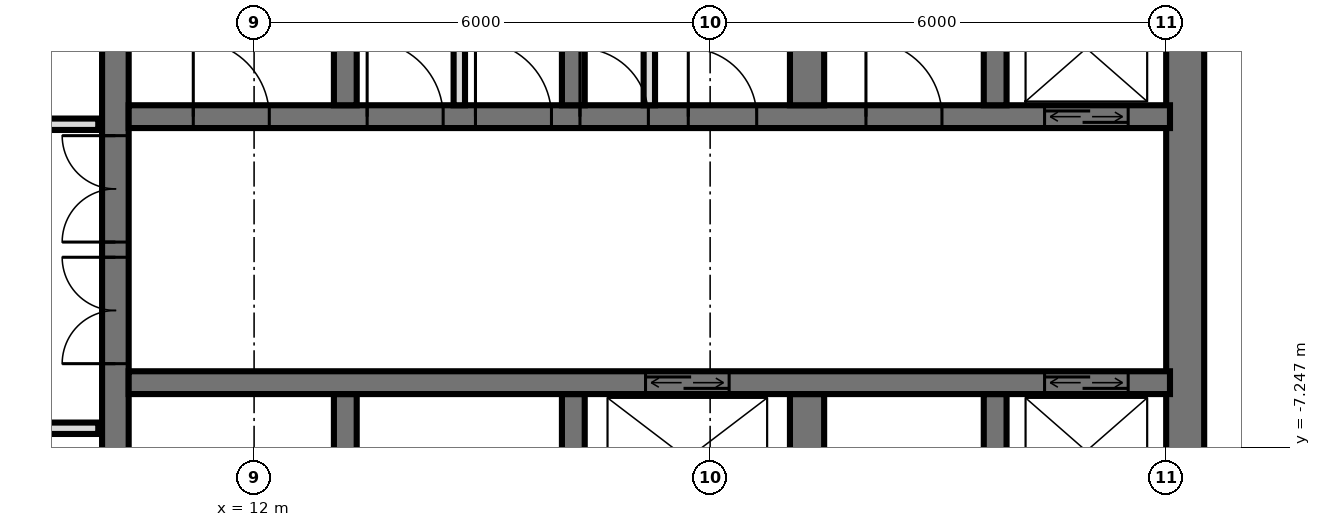
"""IFC4 building model, lengths in metres.
Left out: names, types, materials, properties, quantities, classifications, styles, units other than length and angle.
Written with IfcOpenShell. Run it as: python <this file> out.ifc"""

import sys

from ifc_helpers import new_model, si_unit, direction, frame, frame_2d, origin, place, context, subcontext, project, spatial, rectangle, extrude, element, fill, save


model = new_model("IFC4")
c1 = context("Model", 3, precision=1e-05, world=origin(), true_north=direction((0.0, 1.0)))
c2 = subcontext(c1, "Body", "Model", "MODEL_VIEW")
j1 = project(units=[si_unit("LENGTHUNIT", "METRE"), si_unit("PLANEANGLEUNIT", "RADIAN")], contexts=[c1])
p1 = place(None, origin())
s1 = spatial("IfcSite", under=j1, at=p1, CompositionType="ELEMENT")
p2 = place(p1, origin())
s2 = spatial("IfcBuilding", under=s1, at=p2, CompositionType="ELEMENT")
p3 = place(p2, frame((0.0, 0.0, 170.4)))
s3 = spatial("IfcBuildingStorey", under=s2, at=p3, CompositionType="ELEMENT", Elevation=170.4)
p4 = place(p3, frame((10.175, -14.55, 0.0), z_axis=(0.0, 0.0, 1.0), x_axis=(0.0, 1.0, 0.0)))
e1 = element("IfcWall", 1, at=p4, inside=s3, PredefinedType="SHEAR", context=c2, shape_type="SweptSolid", body=[
    extrude(rectangle(XDim=14.1, YDim=0.35, at=frame_2d((7.05, 0.0))), origin(), (0.0, 0.0, 1.0), 3.6),
])
p5 = place(p4, frame((8.4, 0.0, 0.0)))
e2 = element("IfcOpeningElement", 2, at=p5, cuts=e1, PredefinedType="OPENING", context=c2, shape_type="SweptSolid", body=[
    extrude(rectangle(XDim=1.4, YDim=2.4, at=frame_2d((0.7, 1.2))), frame((0.0, 0.185, 0.0), z_axis=(0.0, -1.0, 0.0), x_axis=(1.0, 0.0, 0.0)), (0.0, 0.0, 1.0), 0.37),
])
p6 = place(p4, frame((10.0, 0.0, 0.0)))
e3 = element("IfcOpeningElement", 3, at=p6, cuts=e1, PredefinedType="OPENING", context=c2, shape_type="SweptSolid", body=[
    extrude(rectangle(XDim=1.4, YDim=2.4, at=frame_2d((0.7, 1.2))), frame((0.0, 0.185, 0.0), z_axis=(0.0, -1.0, 0.0), x_axis=(1.0, 0.0, 0.0)), (0.0, 0.0, 1.0), 0.37),
])
p7 = place(p4, frame((4.0, 0.0, 0.0)))
e4 = element("IfcOpeningElement", 4, at=p7, cuts=e1, PredefinedType="OPENING", context=c2, shape_type="SweptSolid", body=[
    extrude(rectangle(XDim=1.2, YDim=2.1, at=frame_2d((0.6, 1.05))), frame((0.0, 0.185, 0.0), z_axis=(0.0, -1.0, 0.0), x_axis=(1.0, 0.0, 0.0)), (0.0, 0.0, 1.0), 0.37),
])
p8 = place(p3, frame((24.25, -14.55, 0.0), z_axis=(0.0, 0.0, 1.0), x_axis=(0.0, 1.0, 0.0)))
e5 = element("IfcWall", 5, at=p8, inside=s3, PredefinedType="SHEAR", context=c2, shape_type="SweptSolid", body=[
    extrude(rectangle(XDim=14.1, YDim=0.5, at=frame_2d((7.05, 0.0))), origin(), (0.0, 0.0, 1.0), 3.6),
])
p9 = place(p3, frame((10.35, -2.9, 0.0), z_axis=(0.0, 0.0, 1.0), x_axis=(1.0, 0.0, 0.0)))
e6 = element("IfcWall", 6, at=p9, inside=s3, PredefinedType="SHEAR", context=c2, shape_type="SweptSolid", body=[
    extrude(rectangle(XDim=13.7, YDim=0.3, at=frame_2d((6.85, 0.0))), origin(), (0.0, 0.0, 1.0), 3.6),
])
p10 = place(p9, frame((12.05, 0.0, 0.0)))
e7 = element("IfcOpeningElement", 7, at=p10, cuts=e6, PredefinedType="OPENING", context=c2, shape_type="SweptSolid", body=[
    extrude(rectangle(XDim=1.1, YDim=2.1, at=frame_2d((0.55, 1.05))), frame((0.0, 0.16, 0.0), z_axis=(0.0, -1.0, 0.0), x_axis=(1.0, 0.0, 0.0)), (0.0, 0.0, 1.0), 0.32),
])
p11 = place(p9, frame((5.938, 0.0, 0.0)))
e8 = element("IfcOpeningElement", 8, at=p11, cuts=e6, PredefinedType="OPENING", context=c2, shape_type="SweptSolid", body=[
    extrude(rectangle(XDim=0.9, YDim=2.1, at=frame_2d((0.45, 1.05))), frame((0.0, 0.16, 0.0), z_axis=(0.0, -1.0, 0.0), x_axis=(1.0, 0.0, 0.0)), (0.0, 0.0, 1.0), 0.32),
])
p12 = place(p9, frame((7.363, 0.0, 0.0)))
e9 = element("IfcOpeningElement", 9, at=p12, cuts=e6, PredefinedType="OPENING", context=c2, shape_type="SweptSolid", body=[
    extrude(rectangle(XDim=0.9, YDim=2.1, at=frame_2d((0.45, 1.05))), frame((0.0, 0.16, 0.0), z_axis=(0.0, -1.0, 0.0), x_axis=(1.0, 0.0, 0.0)), (0.0, 0.0, 1.0), 0.32),
])
p13 = place(p9, frame((0.85, 0.0, 0.0)))
e10 = element("IfcOpeningElement", 10, at=p13, cuts=e6, PredefinedType="OPENING", context=c2, shape_type="SweptSolid", body=[
    extrude(rectangle(XDim=1.0, YDim=2.1, at=frame_2d((0.5, 1.05))), frame((0.0, 0.16, 0.0), z_axis=(0.0, -1.0, 0.0), x_axis=(1.0, 0.0, 0.0)), (0.0, 0.0, 1.0), 0.32),
])
p14 = place(p9, frame((3.137, 0.0, 0.0)))
e11 = element("IfcOpeningElement", 11, at=p14, cuts=e6, PredefinedType="OPENING", context=c2, shape_type="SweptSolid", body=[
    extrude(rectangle(XDim=1.0, YDim=2.1, at=frame_2d((0.5, 1.05))), frame((0.0, 0.16, 0.0), z_axis=(0.0, -1.0, 0.0), x_axis=(1.0, 0.0, 0.0)), (0.0, 0.0, 1.0), 0.32),
])
p15 = place(p9, frame((4.562, 0.0, 0.0)))
e12 = element("IfcOpeningElement", 12, at=p15, cuts=e6, PredefinedType="OPENING", context=c2, shape_type="SweptSolid", body=[
    extrude(rectangle(XDim=1.0, YDim=2.1, at=frame_2d((0.5, 1.05))), frame((0.0, 0.16, 0.0), z_axis=(0.0, -1.0, 0.0), x_axis=(1.0, 0.0, 0.0)), (0.0, 0.0, 1.0), 0.32),
])
p16 = place(p9, frame((9.7, 0.0, 0.0)))
e13 = element("IfcOpeningElement", 13, at=p16, cuts=e6, PredefinedType="OPENING", context=c2, shape_type="SweptSolid", body=[
    extrude(rectangle(XDim=1.0, YDim=2.1, at=frame_2d((0.5, 1.05))), frame((0.0, 0.16, 0.0), z_axis=(0.0, -1.0, 0.0), x_axis=(1.0, 0.0, 0.0)), (0.0, 0.0, 1.0), 0.32),
])
p17 = place(p3, frame((10.35, -6.4, 0.0), z_axis=(0.0, 0.0, 1.0), x_axis=(1.0, 0.0, 0.0)))
e14 = element("IfcWall", 14, at=p17, inside=s3, PredefinedType="SHEAR", context=c2, shape_type="SweptSolid", body=[
    extrude(rectangle(XDim=13.7, YDim=0.3, at=frame_2d((6.85, 0.0))), origin(), (0.0, 0.0, 1.0), 3.6),
])
p18 = place(p17, frame((12.05, 0.0, 0.0)))
e15 = element("IfcOpeningElement", 15, at=p18, cuts=e14, PredefinedType="OPENING", context=c2, shape_type="SweptSolid", body=[
    extrude(rectangle(XDim=1.1, YDim=2.1, at=frame_2d((0.55, 1.05))), frame((0.0, 0.16, 0.0), z_axis=(0.0, -1.0, 0.0), x_axis=(1.0, 0.0, 0.0)), (0.0, 0.0, 1.0), 0.32),
])
p19 = place(p17, frame((6.8, 0.0, 0.0)))
e16 = element("IfcOpeningElement", 16, at=p19, cuts=e14, PredefinedType="OPENING", context=c2, shape_type="SweptSolid", body=[
    extrude(rectangle(XDim=1.1, YDim=2.1, at=frame_2d((0.55, 1.05))), frame((0.0, 0.16, 0.0), z_axis=(0.0, -1.0, 0.0), x_axis=(1.0, 0.0, 0.0)), (0.0, 0.0, 1.0), 0.32),
])
for number, where, z_axis, x_axis in (
    (17, (13.2, -2.75, 0.0), (0.0, 0.0, 1.0), (0.0, 1.0, 0.0)),
    (18, (13.2, -8.85, 0.0), (0.0, 0.0, 1.0), (0.0, 1.0, 0.0)),
    (19, (16.2, -2.75, 0.0), (0.0, 0.0, 1.0), (0.0, 1.0, 0.0)),
    (20, (16.2, -8.85, 0.0), (0.0, 0.0, 1.0), (0.0, 1.0, 0.0)),
):
    element("IfcWall", number, at=place(p3, frame(where, z_axis=z_axis, x_axis=x_axis)), inside=s3, PredefinedType="SHEAR", context=c2, shape_type="SweptSolid", body=[
        extrude(rectangle(XDim=2.3, YDim=0.3, at=frame_2d((1.15, 0.0))), origin(), (0.0, 0.0, 1.0), 3.6),
    ])
for number, where, z_axis, x_axis in (
    (21, (19.275, -2.75, 0.0), (0.0, 0.0, 1.0), (0.0, 1.0, 0.0)),
    (22, (19.275, -8.85, 0.0), (0.0, 0.0, 1.0), (0.0, 1.0, 0.0)),
):
    element("IfcWall", number, at=place(p3, frame(where, z_axis=z_axis, x_axis=x_axis)), inside=s3, PredefinedType="SHEAR", context=c2, shape_type="SweptSolid", body=[
        extrude(rectangle(XDim=2.3, YDim=0.45, at=frame_2d((1.15, 0.0))), origin(), (0.0, 0.0, 1.0), 3.6),
    ])
for number, where, z_axis, x_axis in (
    (23, (21.75, -2.75, 0.0), (0.0, 0.0, 1.0), (0.0, 1.0, 0.0)),
    (24, (21.75, -8.85, 0.0), (0.0, 0.0, 1.0), (0.0, 1.0, 0.0)),
):
    element("IfcWall", number, at=place(p3, frame(where, z_axis=z_axis, x_axis=x_axis)), inside=s3, PredefinedType="SHEAR", context=c2, shape_type="SweptSolid", body=[
        extrude(rectangle(XDim=2.3, YDim=0.3, at=frame_2d((1.15, 0.0))), origin(), (0.0, 0.0, 1.0), 3.6),
    ])
for number, where, z_axis, x_axis in (
    (25, (17.2, -2.75, 0.0), (0.0, 0.0, 1.0), (0.0, 1.0, 0.0)),
    (26, (14.7, -2.75, 0.0), (0.0, 0.0, 1.0), (0.0, 1.0, 0.0)),
):
    element("IfcWall", number, at=place(p3, frame(where, z_axis=z_axis, x_axis=x_axis)), inside=s3, PredefinedType="PARTITIONING", context=c2, shape_type="SweptSolid", body=[
        extrude(rectangle(XDim=2.3, YDim=0.15, at=frame_2d((1.15, 0.0))), origin(), (0.0, 0.0, 1.0), 3.3),
    ])
p20 = place(p3, frame((-9.95, -7.0, 0.0), z_axis=(0.0, 0.0, 1.0), x_axis=(1.0, 0.0, 0.0)))
e27 = element("IfcWall", 27, at=p20, inside=s3, PredefinedType="PARTITIONING", context=c2, shape_type="SweptSolid", body=[
    extrude(rectangle(XDim=19.9, YDim=0.15, at=frame_2d((9.95, 0.0))), origin(), (0.0, 0.0, 1.0), 3.32),
])
p21 = place(p20, frame((9.45, 0.0, 0.0)))
e28 = element("IfcOpeningElement", 28, at=p21, cuts=e27, PredefinedType="OPENING", context=c2, shape_type="SweptSolid", body=[
    extrude(rectangle(XDim=1.0, YDim=2.1, at=frame_2d((0.5, 1.05))), frame((0.0, 0.085, 0.0), z_axis=(0.0, -1.0, 0.0), x_axis=(1.0, 0.0, 0.0)), (0.0, 0.0, 1.0), 0.17),
])
p22 = place(p20, frame((15.45, 0.0, 0.0)))
e29 = element("IfcOpeningElement", 29, at=p22, cuts=e27, PredefinedType="OPENING", context=c2, shape_type="SweptSolid", body=[
    extrude(rectangle(XDim=1.0, YDim=2.1, at=frame_2d((0.5, 1.05))), frame((0.0, 0.085, 0.0), z_axis=(0.0, -1.0, 0.0), x_axis=(1.0, 0.0, 0.0)), (0.0, 0.0, 1.0), 0.17),
])
p23 = place(p3, frame((-9.95, -3.0, 0.0), z_axis=(0.0, 0.0, 1.0), x_axis=(1.0, 0.0, 0.0)))
e30 = element("IfcWall", 30, at=p23, inside=s3, PredefinedType="PARTITIONING", context=c2, shape_type="SweptSolid", body=[
    extrude(rectangle(XDim=19.9, YDim=0.15, at=frame_2d((9.95, 0.0))), origin(), (0.0, 0.0, 1.0), 3.32),
])
p24 = place(p23, frame((2.2, 0.0, 0.0)))
e31 = element("IfcOpeningElement", 31, at=p24, cuts=e30, PredefinedType="OPENING", context=c2, shape_type="SweptSolid", body=[
    extrude(rectangle(XDim=1.0, YDim=2.1, at=frame_2d((0.5, 1.05))), frame((0.0, 0.085, 0.0), z_axis=(0.0, -1.0, 0.0), x_axis=(1.0, 0.0, 0.0)), (0.0, 0.0, 1.0), 0.17),
])
p25 = place(p23, frame((7.2, 0.0, 0.0)))
e32 = element("IfcOpeningElement", 32, at=p25, cuts=e30, PredefinedType="OPENING", context=c2, shape_type="SweptSolid", body=[
    extrude(rectangle(XDim=1.0, YDim=2.1, at=frame_2d((0.5, 1.05))), frame((0.0, 0.085, 0.0), z_axis=(0.0, -1.0, 0.0), x_axis=(1.0, 0.0, 0.0)), (0.0, 0.0, 1.0), 0.17),
])
p26 = place(p23, frame((11.7, 0.0, 0.0)))
e33 = element("IfcOpeningElement", 33, at=p26, cuts=e30, PredefinedType="OPENING", context=c2, shape_type="SweptSolid", body=[
    extrude(rectangle(XDim=1.0, YDim=2.1, at=frame_2d((0.5, 1.05))), frame((0.0, 0.085, 0.0), z_axis=(0.0, -1.0, 0.0), x_axis=(1.0, 0.0, 0.0)), (0.0, 0.0, 1.0), 0.17),
])
p27 = place(p23, frame((15.45, 0.0, 0.0)))
e34 = element("IfcOpeningElement", 34, at=p27, cuts=e30, PredefinedType="OPENING", context=c2, shape_type="SweptSolid", body=[
    extrude(rectangle(XDim=1.0, YDim=2.1, at=frame_2d((0.5, 1.05))), frame((0.0, 0.085, 0.0), z_axis=(0.0, -1.0, 0.0), x_axis=(1.0, 0.0, 0.0)), (0.0, 0.0, 1.0), 0.17),
])
p28 = place(p23, frame((18.2, 0.0, 0.0)))
e35 = element("IfcOpeningElement", 35, at=p28, cuts=e30, PredefinedType="OPENING", context=c2, shape_type="SweptSolid", body=[
    extrude(rectangle(XDim=1.0, YDim=2.1, at=frame_2d((0.5, 1.05))), frame((0.0, 0.085, 0.0), z_axis=(0.0, -1.0, 0.0), x_axis=(1.0, 0.0, 0.0)), (0.0, 0.0, 1.0), 0.17),
])
p29 = place(p10, origin())
e36 = element("IfcDoor", 36, at=p29, inside=s3, OperationType="DOUBLE_DOOR_SLIDING", PredefinedType="USERDEFINED", context=c2, shape_type="SweptSolid", body=[
    extrude(rectangle(XDim=1.1, YDim=2.1, at=frame_2d((0.55, 1.05))), frame((0.0, 0.025, 0.0), z_axis=(0.0, -1.0, 0.0), x_axis=(1.0, 0.0, 0.0)), (0.0, 0.0, 1.0), 0.05),
])
fill(e7, e36)
p30 = place(p18, origin())
e37 = element("IfcDoor", 37, at=p30, inside=s3, OperationType="DOUBLE_DOOR_SLIDING", PredefinedType="USERDEFINED", context=c2, shape_type="SweptSolid", body=[
    extrude(rectangle(XDim=1.1, YDim=2.1, at=frame_2d((0.55, 1.05))), frame((0.0, 0.025, 0.0), z_axis=(0.0, -1.0, 0.0), x_axis=(1.0, 0.0, 0.0)), (0.0, 0.0, 1.0), 0.05),
])
fill(e15, e37)
p31 = place(p19, origin())
e38 = element("IfcDoor", 38, at=p31, inside=s3, OperationType="DOUBLE_DOOR_SLIDING", PredefinedType="USERDEFINED", context=c2, shape_type="SweptSolid", body=[
    extrude(rectangle(XDim=1.1, YDim=2.1, at=frame_2d((0.55, 1.05))), frame((0.0, 0.025, 0.0), z_axis=(0.0, -1.0, 0.0), x_axis=(1.0, 0.0, 0.0)), (0.0, 0.0, 1.0), 0.05),
])
fill(e16, e38)
p32 = place(p5, origin())
e39 = element("IfcDoor", 39, at=p32, inside=s3, OperationType="DOUBLE_DOOR_SINGLE_SWING", PredefinedType="DOOR", context=c2, shape_type="SweptSolid", body=[
    extrude(rectangle(XDim=1.4, YDim=2.4, at=frame_2d((0.7, 1.2))), frame((0.0, 0.025, 0.0), z_axis=(0.0, -1.0, 0.0), x_axis=(1.0, 0.0, 0.0)), (0.0, 0.0, 1.0), 0.05),
])
fill(e2, e39)
p33 = place(p6, origin())
e40 = element("IfcDoor", 40, at=p33, inside=s3, OperationType="DOUBLE_DOOR_SINGLE_SWING", PredefinedType="DOOR", context=c2, shape_type="SweptSolid", body=[
    extrude(rectangle(XDim=1.4, YDim=2.4, at=frame_2d((0.7, 1.2))), frame((0.0, 0.025, 0.0), z_axis=(0.0, -1.0, 0.0), x_axis=(1.0, 0.0, 0.0)), (0.0, 0.0, 1.0), 0.05),
])
fill(e3, e40)
p34 = place(p11, origin())
e41 = element("IfcDoor", 41, at=p34, inside=s3, OperationType="SINGLE_SWING_RIGHT", PredefinedType="DOOR", context=c2, shape_type="SweptSolid", body=[
    extrude(rectangle(XDim=0.9, YDim=2.1, at=frame_2d((0.45, 1.05))), frame((0.0, 0.025, 0.0), z_axis=(0.0, -1.0, 0.0), x_axis=(1.0, 0.0, 0.0)), (0.0, 0.0, 1.0), 0.05),
])
fill(e8, e41)
p35 = place(p12, origin())
e42 = element("IfcDoor", 42, at=p35, inside=s3, OperationType="SINGLE_SWING_RIGHT", PredefinedType="DOOR", context=c2, shape_type="SweptSolid", body=[
    extrude(rectangle(XDim=0.9, YDim=2.1, at=frame_2d((0.45, 1.05))), frame((0.0, 0.025, 0.0), z_axis=(0.0, -1.0, 0.0), x_axis=(1.0, 0.0, 0.0)), (0.0, 0.0, 1.0), 0.05),
])
fill(e9, e42)
p36 = place(p13, origin())
e43 = element("IfcDoor", 43, at=p36, inside=s3, OperationType="SINGLE_SWING_RIGHT", PredefinedType="DOOR", context=c2, shape_type="SweptSolid", body=[
    extrude(rectangle(XDim=1.0, YDim=2.1, at=frame_2d((0.5, 1.05))), frame((0.0, 0.025, 0.0), z_axis=(0.0, -1.0, 0.0), x_axis=(1.0, 0.0, 0.0)), (0.0, 0.0, 1.0), 0.05),
])
fill(e10, e43)
p37 = place(p14, origin())
e44 = element("IfcDoor", 44, at=p37, inside=s3, OperationType="SINGLE_SWING_RIGHT", PredefinedType="DOOR", context=c2, shape_type="SweptSolid", body=[
    extrude(rectangle(XDim=1.0, YDim=2.1, at=frame_2d((0.5, 1.05))), frame((0.0, 0.025, 0.0), z_axis=(0.0, -1.0, 0.0), x_axis=(1.0, 0.0, 0.0)), (0.0, 0.0, 1.0), 0.05),
])
fill(e11, e44)
p38 = place(p15, origin())
e45 = element("IfcDoor", 45, at=p38, inside=s3, OperationType="SINGLE_SWING_RIGHT", PredefinedType="DOOR", context=c2, shape_type="SweptSolid", body=[
    extrude(rectangle(XDim=1.0, YDim=2.1, at=frame_2d((0.5, 1.05))), frame((0.0, 0.025, 0.0), z_axis=(0.0, -1.0, 0.0), x_axis=(1.0, 0.0, 0.0)), (0.0, 0.0, 1.0), 0.05),
])
fill(e12, e45)
p39 = place(p16, origin())
e46 = element("IfcDoor", 46, at=p39, inside=s3, OperationType="SINGLE_SWING_RIGHT", PredefinedType="DOOR", context=c2, shape_type="SweptSolid", body=[
    extrude(rectangle(XDim=1.0, YDim=2.1, at=frame_2d((0.5, 1.05))), frame((0.0, 0.025, 0.0), z_axis=(0.0, -1.0, 0.0), x_axis=(1.0, 0.0, 0.0)), (0.0, 0.0, 1.0), 0.05),
])
fill(e13, e46)
save(model, sys.argv[1])
